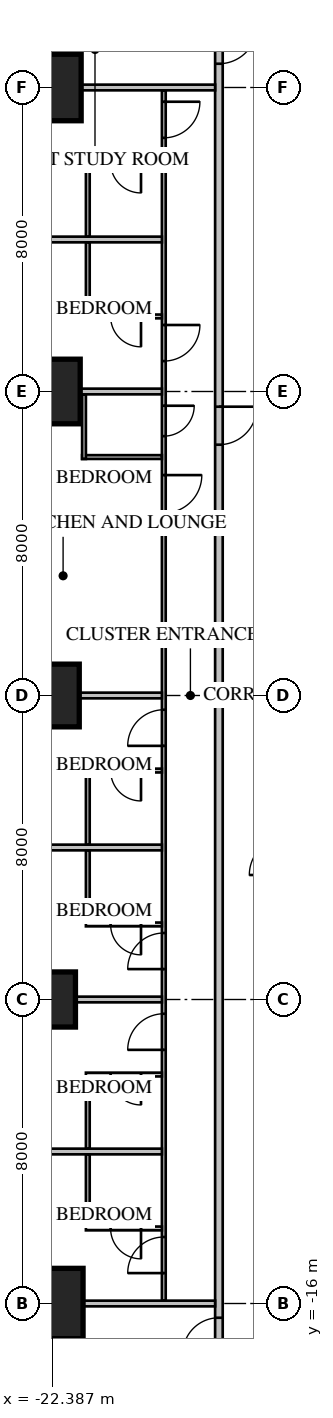
"""IFC4 building model, lengths in metres.
Left out: names, types, materials, properties, quantities, classifications, styles, units other than length and angle.
Written with IfcOpenShell. Run it as: python <this file> out.ifc"""

import sys

from ifc_helpers import new_model, si_unit, direction, frame, frame_2d, origin, origin_2d, place, context, subcontext, project, spatial, rectangle, extrude, element, fill, save


model = new_model("IFC4")
c1 = context("Model", 3, precision=1e-05, world=origin(), true_north=direction((0.0, 1.0)))
c2 = subcontext(c1, "Body", "Model", "MODEL_VIEW")
j1 = project(units=[si_unit("LENGTHUNIT", "METRE"), si_unit("PLANEANGLEUNIT", "RADIAN")], contexts=[c1])
p1 = place(None, origin())
s1 = spatial("IfcSite", under=j1, at=p1, CompositionType="ELEMENT")
p2 = place(p1, origin())
s2 = spatial("IfcBuilding", under=s1, at=p2, CompositionType="ELEMENT")
p3 = place(p2, frame((0.0, 0.0, 31.4)))
s3 = spatial("IfcBuildingStorey", under=s2, at=p3, CompositionType="ELEMENT", Elevation=31.4)
p4 = place(p3, frame((-22.5, 16.0, 0.0), z_axis=(0.0, 0.0, 1.0), x_axis=(1.0, 0.0, 0.0)))
e1 = element("IfcColumn", 1, at=p4, inside=s3, PredefinedType="COLUMN", context=c2, shape_type="SweptSolid", body=[
    extrude(rectangle(XDim=1.75, YDim=1.75, at=origin_2d()), origin(), (0.0, 0.0, 1.0), 3.85),
])
p5 = place(p3, frame((-22.5, 8.0, 0.0), z_axis=(0.0, 0.0, 1.0), x_axis=(1.0, 0.0, 0.0)))
e2 = element("IfcColumn", 2, at=p5, inside=s3, PredefinedType="COLUMN", context=c2, shape_type="SweptSolid", body=[
    extrude(rectangle(XDim=1.7, YDim=1.7, at=origin_2d()), origin(), (0.0, 0.0, 1.0), 3.85),
])
p6 = place(p3, frame((-22.5, 0.0, 0.0), z_axis=(0.0, 0.0, 1.0), x_axis=(1.0, 0.0, 0.0)))
e3 = element("IfcColumn", 3, at=p6, inside=s3, PredefinedType="COLUMN", context=c2, shape_type="SweptSolid", body=[
    extrude(rectangle(XDim=1.65, YDim=1.65, at=origin_2d()), origin(), (0.0, 0.0, 1.0), 3.85),
])
p7 = place(p3, frame((-22.5, -8.0, 0.0), z_axis=(0.0, 0.0, 1.0), x_axis=(1.0, 0.0, 0.0)))
e4 = element("IfcColumn", 4, at=p7, inside=s3, PredefinedType="COLUMN", context=c2, shape_type="SweptSolid", body=[
    extrude(rectangle(XDim=1.45, YDim=1.45, at=origin_2d()), origin(), (0.0, 0.0, 1.0), 3.85),
])
p8 = place(p3, frame((-22.5, -16.0, 0.0), z_axis=(0.0, 0.0, 1.0), x_axis=(1.0, 0.0, 0.0)))
e5 = element("IfcColumn", 5, at=p8, inside=s3, PredefinedType="COLUMN", context=c2, shape_type="SweptSolid", body=[
    extrude(rectangle(XDim=1.85, YDim=1.85, at=origin_2d()), origin(), (0.0, 0.0, 1.0), 3.85),
])
p9 = place(p3, frame((-18.0, 18.0, 0.0), z_axis=(0.0, 0.0, 1.0), x_axis=(0.0, -1.0, 0.0)))
e6 = element("IfcWall", 6, at=p9, inside=s3, PredefinedType="PARTITIONING", context=c2, shape_type="SweptSolid", body=[
    extrude(rectangle(XDim=36.0, YDim=0.2, at=frame_2d((18.0, 0.0))), origin(), (0.0, 0.0, 1.0), 3.65),
])
p10 = place(p9, frame((10.4, 0.0, 0.0)))
e7 = element("IfcOpeningElement", 7, at=p10, cuts=e6, PredefinedType="OPENING", context=c2, shape_type="SweptSolid", body=[
    extrude(rectangle(XDim=1.0, YDim=2.1, at=frame_2d((0.5, 1.05))), frame((0.0, 0.12, 0.0), z_axis=(0.0, -1.0, 0.0), x_axis=(1.0, 0.0, 0.0)), (0.0, 0.0, 1.0), 0.24),
])
p11 = place(p9, frame((0.375, 0.0, 0.0)))
e8 = element("IfcOpeningElement", 8, at=p11, cuts=e6, PredefinedType="OPENING", context=c2, shape_type="SweptSolid", body=[
    extrude(rectangle(XDim=1.0, YDim=2.1, at=frame_2d((0.5, 1.05))), frame((0.0, 0.12, 0.0), z_axis=(0.0, -1.0, 0.0), x_axis=(1.0, 0.0, 0.0)), (0.0, 0.0, 1.0), 0.24),
])
p12 = place(p9, frame((34.375, 0.0, 0.0)))
e9 = element("IfcOpeningElement", 9, at=p12, cuts=e6, PredefinedType="OPENING", context=c2, shape_type="SweptSolid", body=[
    extrude(rectangle(XDim=0.95, YDim=2.1, at=frame_2d((0.475, 1.05))), frame((0.0, 0.12, 0.0), z_axis=(0.0, -1.0, 0.0), x_axis=(1.0, 0.0, 0.0)), (0.0, 0.0, 1.0), 0.24),
])
p13 = place(p3, frame((-19.45, 15.925, 0.0), z_axis=(0.0, 0.0, 1.0), x_axis=(0.0, -1.0, 0.0)))
e10 = element("IfcWall", 10, at=p13, inside=s3, PredefinedType="PARTITIONING", context=c2, shape_type="SweptSolid", body=[
    extrude(rectangle(XDim=31.85, YDim=0.1, at=frame_2d((15.925, 0.0))), origin(), (0.0, 0.0, 1.0), 3.65),
])
p14 = place(p13, frame((10.125, 0.0, 0.0)))
e11 = element("IfcOpeningElement", 11, at=p14, cuts=e10, PredefinedType="OPENING", context=c2, shape_type="SweptSolid", body=[
    extrude(rectangle(XDim=1.0, YDim=2.1, at=frame_2d((0.5, 1.05))), frame((0.0, 0.07, 0.0), z_axis=(0.0, -1.0, 0.0), x_axis=(1.0, 0.0, 0.0)), (0.0, 0.0, 1.0), 0.14),
])
p15 = place(p13, frame((8.3, 0.0, 0.0)))
e12 = element("IfcOpeningElement", 12, at=p15, cuts=e10, PredefinedType="OPENING", context=c2, shape_type="SweptSolid", body=[
    extrude(rectangle(XDim=0.8, YDim=2.1, at=frame_2d((0.4, 1.05))), frame((0.0, 0.07, 0.0), z_axis=(0.0, -1.0, 0.0), x_axis=(1.0, 0.0, 0.0)), (0.0, 0.0, 1.0), 0.14),
])
p16 = place(p13, frame((0.3, 0.0, 0.0)))
e13 = element("IfcOpeningElement", 13, at=p16, cuts=e10, PredefinedType="OPENING", context=c2, shape_type="SweptSolid", body=[
    extrude(rectangle(XDim=0.95, YDim=2.1, at=frame_2d((0.475, 1.05))), frame((0.0, 0.07, 0.0), z_axis=(0.0, -1.0, 0.0), x_axis=(1.0, 0.0, 0.0)), (0.0, 0.0, 1.0), 0.14),
])
p17 = place(p13, frame((6.175, 0.0, 0.0)))
e14 = element("IfcOpeningElement", 14, at=p17, cuts=e10, PredefinedType="OPENING", context=c2, shape_type="SweptSolid", body=[
    extrude(rectangle(XDim=0.95, YDim=2.1, at=frame_2d((0.475, 1.05))), frame((0.0, 0.07, 0.0), z_axis=(0.0, -1.0, 0.0), x_axis=(1.0, 0.0, 0.0)), (0.0, 0.0, 1.0), 0.14),
])
p18 = place(p13, frame((16.3, 0.0, 0.0)))
e15 = element("IfcOpeningElement", 15, at=p18, cuts=e10, PredefinedType="OPENING", context=c2, shape_type="SweptSolid", body=[
    extrude(rectangle(XDim=0.95, YDim=2.1, at=frame_2d((0.475, 1.05))), frame((0.0, 0.07, 0.0), z_axis=(0.0, -1.0, 0.0), x_axis=(1.0, 0.0, 0.0)), (0.0, 0.0, 1.0), 0.14),
])
p19 = place(p13, frame((22.175, 0.0, 0.0)))
e16 = element("IfcOpeningElement", 16, at=p19, cuts=e10, PredefinedType="OPENING", context=c2, shape_type="SweptSolid", body=[
    extrude(rectangle(XDim=0.95, YDim=2.1, at=frame_2d((0.475, 1.05))), frame((0.0, 0.07, 0.0), z_axis=(0.0, -1.0, 0.0), x_axis=(1.0, 0.0, 0.0)), (0.0, 0.0, 1.0), 0.14),
])
p20 = place(p13, frame((24.3, 0.0, 0.0)))
e17 = element("IfcOpeningElement", 17, at=p20, cuts=e10, PredefinedType="OPENING", context=c2, shape_type="SweptSolid", body=[
    extrude(rectangle(XDim=0.95, YDim=2.1, at=frame_2d((0.475, 1.05))), frame((0.0, 0.07, 0.0), z_axis=(0.0, -1.0, 0.0), x_axis=(1.0, 0.0, 0.0)), (0.0, 0.0, 1.0), 0.14),
])
p21 = place(p13, frame((30.175, 0.0, 0.0)))
e18 = element("IfcOpeningElement", 18, at=p21, cuts=e10, PredefinedType="OPENING", context=c2, shape_type="SweptSolid", body=[
    extrude(rectangle(XDim=0.95, YDim=2.1, at=frame_2d((0.475, 1.05))), frame((0.0, 0.07, 0.0), z_axis=(0.0, -1.0, 0.0), x_axis=(1.0, 0.0, 0.0)), (0.0, 0.0, 1.0), 0.14),
])
p22 = place(p3, frame((-19.5, 6.275, 0.0), z_axis=(0.0, 0.0, 1.0), x_axis=(-1.0, 0.0, 0.0)))
e19 = element("IfcWall", 19, at=p22, inside=s3, PredefinedType="PARTITIONING", context=c2, shape_type="SweptSolid", body=[
    extrude(rectangle(XDim=2.1, YDim=0.1, at=frame_2d((1.05, 0.0))), origin(), (0.0, 0.0, 1.0), 3.65),
])
p23 = place(p3, frame((-21.55, 7.925, 0.0), z_axis=(0.0, 0.0, 1.0), x_axis=(0.0, -1.0, 0.0)))
e20 = element("IfcWall", 20, at=p23, inside=s3, PredefinedType="PARTITIONING", context=c2, shape_type="SweptSolid", body=[
    extrude(rectangle(XDim=1.7, YDim=0.1, at=frame_2d((0.85, 0.0))), origin(), (0.0, 0.0, 1.0), 3.65),
])
p24 = place(p3, frame((-18.1, 16.0, 0.0), z_axis=(0.0, 0.0, 1.0), x_axis=(-1.0, 0.0, 0.0)))
e21 = element("IfcWall", 21, at=p24, inside=s3, PredefinedType="PARTITIONING", context=c2, shape_type="SweptSolid", body=[
    extrude(rectangle(XDim=6.589, YDim=0.15, at=frame_2d((3.295, 0.0))), origin(), (0.0, 0.0, 1.0), 3.65),
])
for number, where, z_axis, x_axis in (
    (22, (-19.5, 12.0, 0.0), (0.0, 0.0, 1.0), (-1.0, 0.0, 0.0)),
    (23, (-19.5, 8.0, 0.0), (0.0, 0.0, 1.0), (-1.0, 0.0, 0.0)),
):
    element("IfcWall", number, at=place(p3, frame(where, z_axis=z_axis, x_axis=x_axis)), inside=s3, PredefinedType="PARTITIONING", context=c2, shape_type="SweptSolid", body=[
        extrude(rectangle(XDim=5.2, YDim=0.15, at=frame_2d((2.6, 0.0))), origin(), (0.0, 0.0, 1.0), 3.65),
    ])
p25 = place(p3, frame((-19.5, 0.0, 0.0), z_axis=(0.0, 0.0, 1.0), x_axis=(-1.0, 0.0, 0.0)))
e24 = element("IfcWall", 24, at=p25, inside=s3, PredefinedType="PARTITIONING", context=c2, shape_type="SweptSolid", body=[
    extrude(rectangle(XDim=5.2, YDim=0.15, at=frame_2d((2.6, 0.0))), origin(), (0.0, 0.0, 1.0), 2.957),
])
for number, where, z_axis, x_axis in (
    (25, (-19.5, -4.0, 0.0), (0.0, 0.0, 1.0), (-1.0, 0.0, 0.0)),
    (26, (-19.5, -8.0, 0.0), (0.0, 0.0, 1.0), (-1.0, 0.0, 0.0)),
    (27, (-19.5, -12.0, 0.0), (0.0, 0.0, 1.0), (-1.0, 0.0, 0.0)),
):
    element("IfcWall", number, at=place(p3, frame(where, z_axis=z_axis, x_axis=x_axis)), inside=s3, PredefinedType="PARTITIONING", context=c2, shape_type="SweptSolid", body=[
        extrude(rectangle(XDim=5.2, YDim=0.15, at=frame_2d((2.6, 0.0))), origin(), (0.0, 0.0, 1.0), 3.65),
    ])
p26 = place(p3, frame((-18.1, -16.0, 0.0), z_axis=(0.0, 0.0, 1.0), x_axis=(-1.0, 0.0, 0.0)))
e28 = element("IfcWall", 28, at=p26, inside=s3, PredefinedType="PARTITIONING", context=c2, shape_type="SweptSolid", body=[
    extrude(rectangle(XDim=6.589, YDim=0.15, at=frame_2d((3.295, 0.0))), origin(), (0.0, 0.0, 1.0), 3.65),
])
p27 = place(p3, frame((-19.5, 14.025, 0.0), z_axis=(0.0, 0.0, 1.0), x_axis=(-1.0, 0.0, 0.0)))
e29 = element("IfcWall", 29, at=p27, inside=s3, PredefinedType="PARTITIONING", context=c2, shape_type="SweptSolid", body=[
    extrude(rectangle(XDim=2.0, YDim=0.1, at=frame_2d((1.0, 0.0))), origin(), (0.0, 0.0, 1.0), 3.65),
])
p28 = place(p27, frame((0.55, 0.0, 0.0)))
e30 = element("IfcOpeningElement", 30, at=p28, cuts=e29, PredefinedType="OPENING", context=c2, shape_type="SweptSolid", body=[
    extrude(rectangle(XDim=0.8, YDim=2.1, at=frame_2d((0.4, 1.05))), frame((0.0, 0.07, 0.0), z_axis=(0.0, -1.0, 0.0), x_axis=(1.0, 0.0, 0.0)), (0.0, 0.0, 1.0), 0.14),
])
p29 = place(p3, frame((-21.45, 13.975, 0.0), z_axis=(0.0, 0.0, 1.0), x_axis=(0.0, -1.0, 0.0)))
e31 = element("IfcWall", 31, at=p29, inside=s3, PredefinedType="PARTITIONING", context=c2, shape_type="SweptSolid", body=[
    extrude(rectangle(XDim=1.9, YDim=0.1, at=frame_2d((0.95, 0.0))), origin(), (0.0, 0.0, 1.0), 3.65),
])
p30 = place(p3, frame((-19.5, 9.975, 0.0), z_axis=(0.0, 0.0, 1.0), x_axis=(-1.0, 0.0, 0.0)))
e32 = element("IfcWall", 32, at=p30, inside=s3, PredefinedType="PARTITIONING", context=c2, shape_type="SweptSolid", body=[
    extrude(rectangle(XDim=2.0, YDim=0.1, at=frame_2d((1.0, 0.0))), origin(), (0.0, 0.0, 1.0), 3.65),
])
p31 = place(p30, frame((0.55, 0.0, 0.0)))
e33 = element("IfcOpeningElement", 33, at=p31, cuts=e32, PredefinedType="OPENING", context=c2, shape_type="SweptSolid", body=[
    extrude(rectangle(XDim=0.8, YDim=2.1, at=frame_2d((0.4, 1.05))), frame((0.0, 0.07, 0.0), z_axis=(0.0, -1.0, 0.0), x_axis=(1.0, 0.0, 0.0)), (0.0, 0.0, 1.0), 0.14),
])
p32 = place(p3, frame((-21.45, 11.925, 0.0), z_axis=(0.0, 0.0, 1.0), x_axis=(0.0, -1.0, 0.0)))
e34 = element("IfcWall", 34, at=p32, inside=s3, PredefinedType="PARTITIONING", context=c2, shape_type="SweptSolid", body=[
    extrude(rectangle(XDim=1.9, YDim=0.1, at=frame_2d((0.95, 0.0))), origin(), (0.0, 0.0, 1.0), 3.65),
])
p33 = place(p3, frame((-19.5, -1.975, 0.0), z_axis=(0.0, 0.0, 1.0), x_axis=(-1.0, 0.0, 0.0)))
e35 = element("IfcWall", 35, at=p33, inside=s3, PredefinedType="PARTITIONING", context=c2, shape_type="SweptSolid", body=[
    extrude(rectangle(XDim=2.0, YDim=0.1, at=frame_2d((1.0, 0.0))), origin(), (0.0, 0.0, 1.0), 3.65),
])
p34 = place(p33, frame((0.55, 0.0, 0.0)))
e36 = element("IfcOpeningElement", 36, at=p34, cuts=e35, PredefinedType="OPENING", context=c2, shape_type="SweptSolid", body=[
    extrude(rectangle(XDim=0.8, YDim=2.1, at=frame_2d((0.4, 1.05))), frame((0.0, 0.07, 0.0), z_axis=(0.0, -1.0, 0.0), x_axis=(1.0, 0.0, 0.0)), (0.0, 0.0, 1.0), 0.14),
])
p35 = place(p3, frame((-21.45, -2.025, 0.0), z_axis=(0.0, 0.0, 1.0), x_axis=(0.0, -1.0, 0.0)))
e37 = element("IfcWall", 37, at=p35, inside=s3, PredefinedType="PARTITIONING", context=c2, shape_type="SweptSolid", body=[
    extrude(rectangle(XDim=1.9, YDim=0.1, at=frame_2d((0.95, 0.0))), origin(), (0.0, 0.0, 1.0), 3.65),
])
p36 = place(p3, frame((-19.5, -6.025, 0.0), z_axis=(0.0, 0.0, 1.0), x_axis=(-1.0, 0.0, 0.0)))
e38 = element("IfcWall", 38, at=p36, inside=s3, PredefinedType="PARTITIONING", context=c2, shape_type="SweptSolid", body=[
    extrude(rectangle(XDim=2.0, YDim=0.1, at=frame_2d((1.0, 0.0))), origin(), (0.0, 0.0, 1.0), 3.65),
])
p37 = place(p36, frame((0.55, 0.0, 0.0)))
e39 = element("IfcOpeningElement", 39, at=p37, cuts=e38, PredefinedType="OPENING", context=c2, shape_type="SweptSolid", body=[
    extrude(rectangle(XDim=0.8, YDim=2.1, at=frame_2d((0.4, 1.05))), frame((0.0, 0.07, 0.0), z_axis=(0.0, -1.0, 0.0), x_axis=(1.0, 0.0, 0.0)), (0.0, 0.0, 1.0), 0.14),
])
p38 = place(p3, frame((-21.45, -4.075, 0.0), z_axis=(0.0, 0.0, 1.0), x_axis=(0.0, -1.0, 0.0)))
e40 = element("IfcWall", 40, at=p38, inside=s3, PredefinedType="PARTITIONING", context=c2, shape_type="SweptSolid", body=[
    extrude(rectangle(XDim=1.9, YDim=0.1, at=frame_2d((0.95, 0.0))), origin(), (0.0, 0.0, 1.0), 3.65),
])
p39 = place(p3, frame((-19.5, -9.975, 0.0), z_axis=(0.0, 0.0, 1.0), x_axis=(-1.0, 0.0, 0.0)))
e41 = element("IfcWall", 41, at=p39, inside=s3, PredefinedType="PARTITIONING", context=c2, shape_type="SweptSolid", body=[
    extrude(rectangle(XDim=2.0, YDim=0.1, at=frame_2d((1.0, 0.0))), origin(), (0.0, 0.0, 1.0), 3.65),
])
p40 = place(p39, frame((0.55, 0.0, 0.0)))
e42 = element("IfcOpeningElement", 42, at=p40, cuts=e41, PredefinedType="OPENING", context=c2, shape_type="SweptSolid", body=[
    extrude(rectangle(XDim=0.8, YDim=2.1, at=frame_2d((0.4, 1.05))), frame((0.0, 0.07, 0.0), z_axis=(0.0, -1.0, 0.0), x_axis=(1.0, 0.0, 0.0)), (0.0, 0.0, 1.0), 0.14),
])
p41 = place(p3, frame((-21.45, -10.025, 0.0), z_axis=(0.0, 0.0, 1.0), x_axis=(0.0, -1.0, 0.0)))
e43 = element("IfcWall", 43, at=p41, inside=s3, PredefinedType="PARTITIONING", context=c2, shape_type="SweptSolid", body=[
    extrude(rectangle(XDim=1.9, YDim=0.1, at=frame_2d((0.95, 0.0))), origin(), (0.0, 0.0, 1.0), 3.65),
])
p42 = place(p3, frame((-19.5, -14.025, 0.0), z_axis=(0.0, 0.0, 1.0), x_axis=(-1.0, 0.0, 0.0)))
e44 = element("IfcWall", 44, at=p42, inside=s3, PredefinedType="PARTITIONING", context=c2, shape_type="SweptSolid", body=[
    extrude(rectangle(XDim=2.0, YDim=0.1, at=frame_2d((1.0, 0.0))), origin(), (0.0, 0.0, 1.0), 3.65),
])
p43 = place(p42, frame((0.55, 0.0, 0.0)))
e45 = element("IfcOpeningElement", 45, at=p43, cuts=e44, PredefinedType="OPENING", context=c2, shape_type="SweptSolid", body=[
    extrude(rectangle(XDim=0.8, YDim=2.1, at=frame_2d((0.4, 1.05))), frame((0.0, 0.07, 0.0), z_axis=(0.0, -1.0, 0.0), x_axis=(1.0, 0.0, 0.0)), (0.0, 0.0, 1.0), 0.14),
])
p44 = place(p3, frame((-21.45, -12.075, 0.0), z_axis=(0.0, 0.0, 1.0), x_axis=(0.0, -1.0, 0.0)))
e46 = element("IfcWall", 46, at=p44, inside=s3, PredefinedType="PARTITIONING", context=c2, shape_type="SweptSolid", body=[
    extrude(rectangle(XDim=1.9, YDim=0.1, at=frame_2d((0.95, 0.0))), origin(), (0.0, 0.0, 1.0), 3.65),
])
p45 = place(p10, origin())
e47 = element("IfcDoor", 47, at=p45, inside=s3, OperationType="SINGLE_SWING_LEFT", PredefinedType="DOOR", context=c2, shape_type="SweptSolid", body=[
    extrude(rectangle(XDim=1.0, YDim=2.1, at=frame_2d((0.5, 1.05))), frame((0.0, 0.025, 0.0), z_axis=(0.0, -1.0, 0.0), x_axis=(1.0, 0.0, 0.0)), (0.0, 0.0, 1.0), 0.05),
])
fill(e7, e47)
p46 = place(p14, origin())
e48 = element("IfcDoor", 48, at=p46, inside=s3, OperationType="SINGLE_SWING_LEFT", PredefinedType="DOOR", context=c2, shape_type="SweptSolid", body=[
    extrude(rectangle(XDim=1.0, YDim=2.1, at=frame_2d((0.5, 1.05))), frame((0.0, 0.025, 0.0), z_axis=(0.0, -1.0, 0.0), x_axis=(1.0, 0.0, 0.0)), (0.0, 0.0, 1.0), 0.05),
])
fill(e11, e48)
p47 = place(p15, origin())
e49 = element("IfcDoor", 49, at=p47, inside=s3, OperationType="SINGLE_SWING_LEFT", PredefinedType="DOOR", context=c2, shape_type="SweptSolid", body=[
    extrude(rectangle(XDim=0.8, YDim=2.1, at=frame_2d((0.4, 1.05))), frame((0.0, 0.025, 0.0), z_axis=(0.0, -1.0, 0.0), x_axis=(1.0, 0.0, 0.0)), (0.0, 0.0, 1.0), 0.05),
])
fill(e12, e49)
p48 = place(p11, origin())
e50 = element("IfcDoor", 50, at=p48, inside=s3, OperationType="SINGLE_SWING_LEFT", PredefinedType="DOOR", context=c2, shape_type="SweptSolid", body=[
    extrude(rectangle(XDim=1.0, YDim=2.1, at=frame_2d((0.5, 1.05))), frame((0.0, 0.025, 0.0), z_axis=(0.0, -1.0, 0.0), x_axis=(1.0, 0.0, 0.0)), (0.0, 0.0, 1.0), 0.05),
])
fill(e8, e50)
p49 = place(p16, origin())
e51 = element("IfcDoor", 51, at=p49, inside=s3, OperationType="SINGLE_SWING_LEFT", PredefinedType="DOOR", context=c2, shape_type="SweptSolid", body=[
    extrude(rectangle(XDim=0.95, YDim=2.1, at=frame_2d((0.475, 1.05))), frame((0.0, 0.025, 0.0), z_axis=(0.0, -1.0, 0.0), x_axis=(1.0, 0.0, 0.0)), (0.0, 0.0, 1.0), 0.05),
])
fill(e13, e51)
p50 = place(p28, origin())
e52 = element("IfcDoor", 52, at=p50, inside=s3, OperationType="SINGLE_SWING_LEFT", PredefinedType="DOOR", context=c2, shape_type="SweptSolid", body=[
    extrude(rectangle(XDim=0.8, YDim=2.1, at=frame_2d((0.4, 1.05))), frame((0.0, 0.025, 0.0), z_axis=(0.0, -1.0, 0.0), x_axis=(1.0, 0.0, 0.0)), (0.0, 0.0, 1.0), 0.05),
])
fill(e30, e52)
p51 = place(p17, origin())
e53 = element("IfcDoor", 53, at=p51, inside=s3, OperationType="SINGLE_SWING_LEFT", PredefinedType="DOOR", context=c2, shape_type="SweptSolid", body=[
    extrude(rectangle(XDim=0.95, YDim=2.1, at=frame_2d((0.475, 1.05))), frame((0.0, 0.025, 0.0), z_axis=(0.0, -1.0, 0.0), x_axis=(1.0, 0.0, 0.0)), (0.0, 0.0, 1.0), 0.05),
])
fill(e14, e53)
p52 = place(p31, origin())
e54 = element("IfcDoor", 54, at=p52, inside=s3, OperationType="SINGLE_SWING_LEFT", PredefinedType="DOOR", context=c2, shape_type="SweptSolid", body=[
    extrude(rectangle(XDim=0.8, YDim=2.1, at=frame_2d((0.4, 1.05))), frame((0.0, 0.025, 0.0), z_axis=(0.0, -1.0, 0.0), x_axis=(1.0, 0.0, 0.0)), (0.0, 0.0, 1.0), 0.05),
])
fill(e33, e54)
p53 = place(p18, origin())
e55 = element("IfcDoor", 55, at=p53, inside=s3, OperationType="SINGLE_SWING_RIGHT", PredefinedType="DOOR", context=c2, shape_type="SweptSolid", body=[
    extrude(rectangle(XDim=0.95, YDim=2.1, at=frame_2d((0.475, 1.05))), frame((0.0, 0.025, 0.0), z_axis=(0.0, -1.0, 0.0), x_axis=(1.0, 0.0, 0.0)), (0.0, 0.0, 1.0), 0.05),
])
fill(e15, e55)
p54 = place(p34, origin())
e56 = element("IfcDoor", 56, at=p54, inside=s3, OperationType="SINGLE_SWING_LEFT", PredefinedType="DOOR", context=c2, shape_type="SweptSolid", body=[
    extrude(rectangle(XDim=0.8, YDim=2.1, at=frame_2d((0.4, 1.05))), frame((0.0, 0.025, 0.0), z_axis=(0.0, -1.0, 0.0), x_axis=(1.0, 0.0, 0.0)), (0.0, 0.0, 1.0), 0.05),
])
fill(e36, e56)
p55 = place(p19, origin())
e57 = element("IfcDoor", 57, at=p55, inside=s3, OperationType="SINGLE_SWING_RIGHT", PredefinedType="DOOR", context=c2, shape_type="SweptSolid", body=[
    extrude(rectangle(XDim=0.95, YDim=2.1, at=frame_2d((0.475, 1.05))), frame((0.0, 0.025, 0.0), z_axis=(0.0, -1.0, 0.0), x_axis=(1.0, 0.0, 0.0)), (0.0, 0.0, 1.0), 0.05),
])
fill(e16, e57)
p56 = place(p37, origin())
e58 = element("IfcDoor", 58, at=p56, inside=s3, OperationType="SINGLE_SWING_LEFT", PredefinedType="DOOR", context=c2, shape_type="SweptSolid", body=[
    extrude(rectangle(XDim=0.8, YDim=2.1, at=frame_2d((0.4, 1.05))), frame((0.0, 0.025, 0.0), z_axis=(0.0, -1.0, 0.0), x_axis=(1.0, 0.0, 0.0)), (0.0, 0.0, 1.0), 0.05),
])
fill(e39, e58)
p57 = place(p20, origin())
e59 = element("IfcDoor", 59, at=p57, inside=s3, OperationType="SINGLE_SWING_RIGHT", PredefinedType="DOOR", context=c2, shape_type="SweptSolid", body=[
    extrude(rectangle(XDim=0.95, YDim=2.1, at=frame_2d((0.475, 1.05))), frame((0.0, 0.025, 0.0), z_axis=(0.0, -1.0, 0.0), x_axis=(1.0, 0.0, 0.0)), (0.0, 0.0, 1.0), 0.05),
])
fill(e17, e59)
p58 = place(p40, origin())
e60 = element("IfcDoor", 60, at=p58, inside=s3, OperationType="SINGLE_SWING_LEFT", PredefinedType="DOOR", context=c2, shape_type="SweptSolid", body=[
    extrude(rectangle(XDim=0.8, YDim=2.1, at=frame_2d((0.4, 1.05))), frame((0.0, 0.025, 0.0), z_axis=(0.0, -1.0, 0.0), x_axis=(1.0, 0.0, 0.0)), (0.0, 0.0, 1.0), 0.05),
])
fill(e42, e60)
p59 = place(p21, origin())
e61 = element("IfcDoor", 61, at=p59, inside=s3, OperationType="SINGLE_SWING_RIGHT", PredefinedType="DOOR", context=c2, shape_type="SweptSolid", body=[
    extrude(rectangle(XDim=0.95, YDim=2.1, at=frame_2d((0.475, 1.05))), frame((0.0, 0.025, 0.0), z_axis=(0.0, -1.0, 0.0), x_axis=(1.0, 0.0, 0.0)), (0.0, 0.0, 1.0), 0.05),
])
fill(e18, e61)
p60 = place(p43, origin())
e62 = element("IfcDoor", 62, at=p60, inside=s3, OperationType="SINGLE_SWING_LEFT", PredefinedType="DOOR", context=c2, shape_type="SweptSolid", body=[
    extrude(rectangle(XDim=0.8, YDim=2.1, at=frame_2d((0.4, 1.05))), frame((0.0, 0.025, 0.0), z_axis=(0.0, -1.0, 0.0), x_axis=(1.0, 0.0, 0.0)), (0.0, 0.0, 1.0), 0.05),
])
fill(e45, e62)
p61 = place(p12, origin())
e63 = element("IfcDoor", 63, at=p61, inside=s3, OperationType="SINGLE_SWING_RIGHT", PredefinedType="DOOR", context=c2, shape_type="SweptSolid", body=[
    extrude(rectangle(XDim=0.95, YDim=2.1, at=frame_2d((0.475, 1.05))), frame((0.0, 0.025, 0.0), z_axis=(0.0, -1.0, 0.0), x_axis=(1.0, 0.0, 0.0)), (0.0, 0.0, 1.0), 0.05),
])
fill(e9, e63)
save(model, sys.argv[1])
